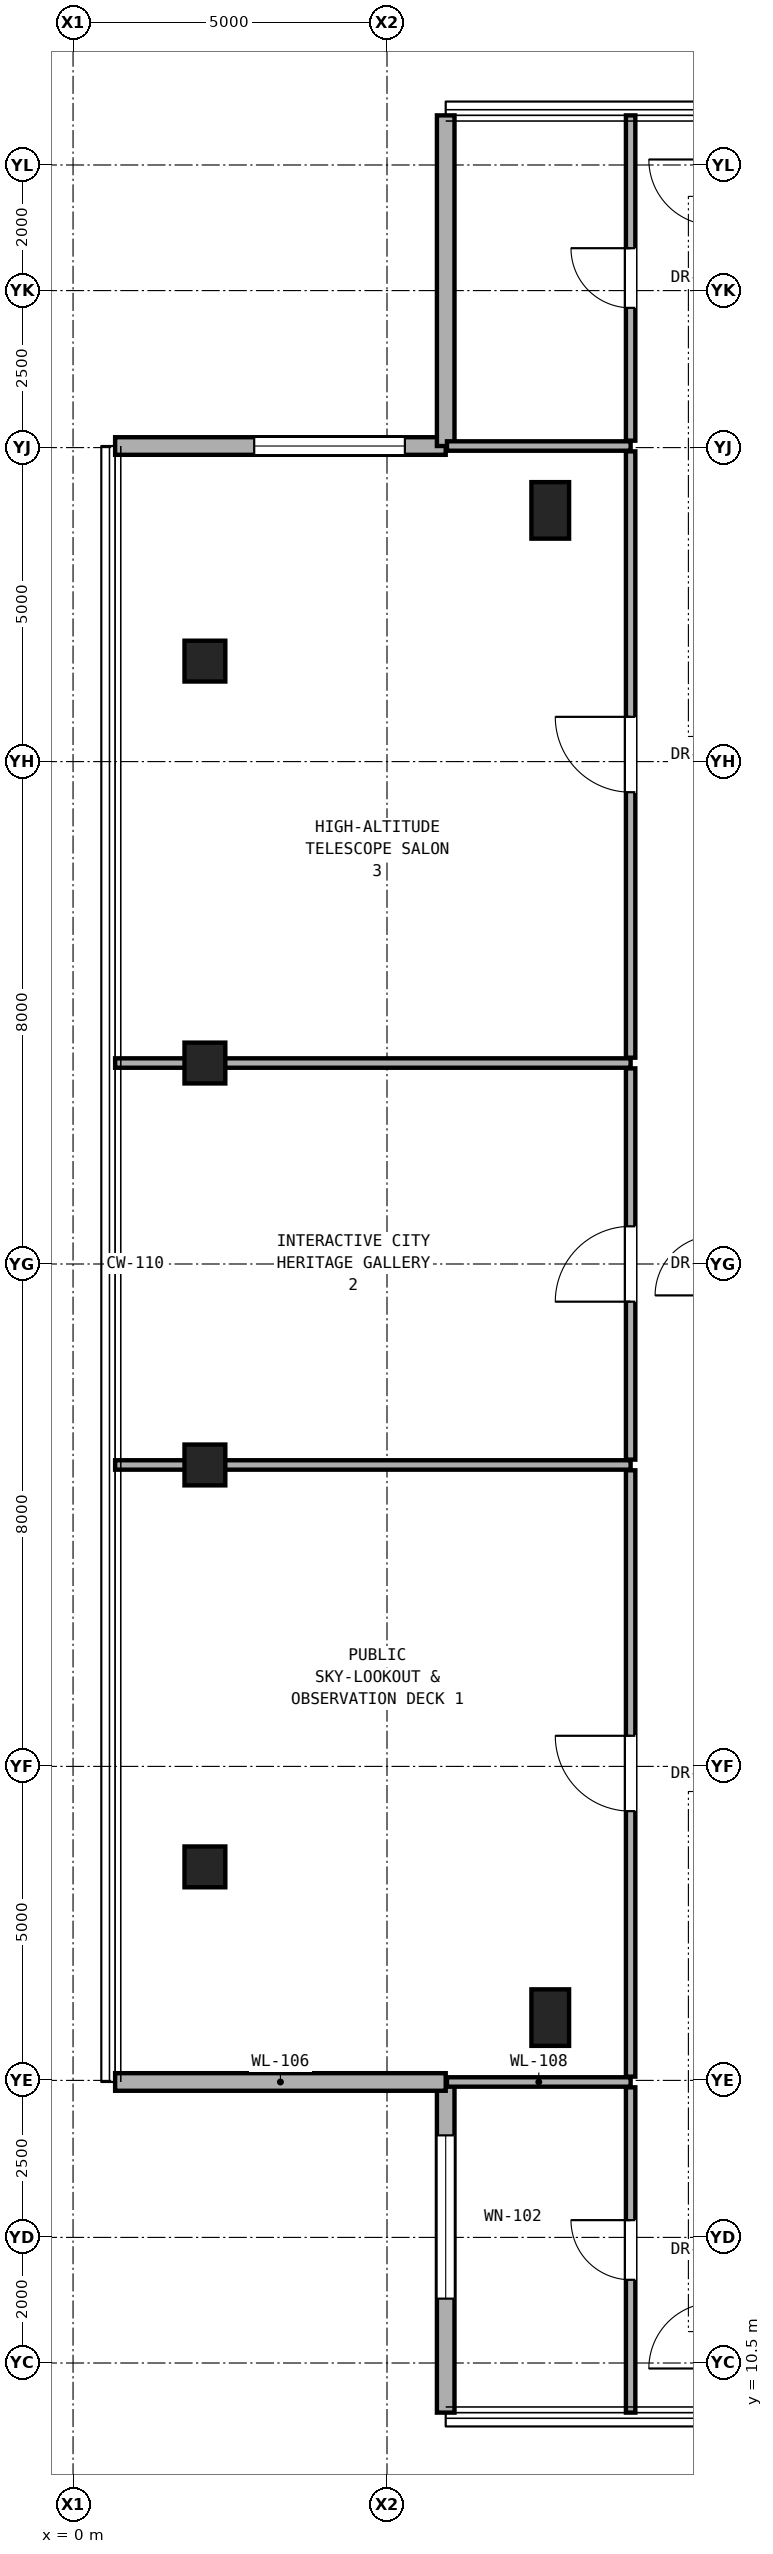
"""IFC4 building model, lengths in metres.
Left out: names, types, materials, properties, quantities, classifications, styles, units other than length and angle.
Written with IfcOpenShell. Run it as: python <this file> out.ifc"""

import sys

from ifc_helpers import new_model, si_unit, direction, frame, frame_2d, origin, origin_2d, place, context, subcontext, project, spatial, rectangle, hollow_rectangle, extrude, element, fill, save


model = new_model("IFC4")
c1 = context("Model", 3, precision=1e-05, world=origin(), true_north=direction((0.0, 1.0)))
c2 = subcontext(c1, "Body", "Model", "MODEL_VIEW")
j1 = project(units=[si_unit("LENGTHUNIT", "METRE"), si_unit("PLANEANGLEUNIT", "RADIAN")], contexts=[c1])
p1 = place(None, origin())
s1 = spatial("IfcSite", under=j1, at=p1, CompositionType="ELEMENT")
p2 = place(p1, origin())
s2 = spatial("IfcBuilding", under=s1, at=p2, CompositionType="ELEMENT")
p3 = place(p2, frame((0.0, 0.0, 249.1)))
s3 = spatial("IfcBuildingStorey", under=s2, at=p3, CompositionType="ELEMENT", Elevation=249.1)
for number, where, z_axis, x_axis in (
    (1, (2.1, 18.4, 0.0), (0.0, 0.0, 1.0), (1.0, 0.0, 0.0)),
    (2, (2.1, 24.8, 0.0), (0.0, 0.0, 1.0), (1.0, 0.0, 0.0)),
    (3, (2.1, 31.2, 0.0), (0.0, 0.0, 1.0), (1.0, 0.0, 0.0)),
    (4, (2.1, 37.6, 0.0), (0.0, 0.0, 1.0), (1.0, 0.0, 0.0)),
):
    element("IfcColumn", number, at=place(p3, frame(where, z_axis=z_axis, x_axis=x_axis)), inside=s3, PredefinedType="COLUMN", context=c2, shape_type="SweptSolid", body=[
        extrude(hollow_rectangle(XDim=0.65, YDim=0.65, WallThickness=0.036, at=origin_2d()), origin(), (0.0, 0.0, 1.0), 3.6),
    ])
for number, where, z_axis, x_axis in (
    (5, (7.6, 16.0, 0.0), (0.0, 0.0, 1.0), (1.0, 0.0, 0.0)),
    (6, (7.6, 40.0, 0.0), (0.0, 0.0, 1.0), (1.0, 0.0, 0.0)),
):
    element("IfcColumn", number, at=place(p3, frame(where, z_axis=z_axis, x_axis=x_axis)), inside=s3, PredefinedType="PILASTER", context=c2, shape_type="SweptSolid", body=[
        extrude(rectangle(XDim=0.6, YDim=0.9, at=origin_2d()), origin(), (0.0, 0.0, 1.0), 3.6),
    ])
p4 = place(p3, frame((5.935, 14.975, 0.0), z_axis=(0.0, 0.0, 1.0), x_axis=(0.0, -1.0, 0.0)))
e7 = element("IfcWall", 7, at=p4, inside=s3, PredefinedType="SOLIDWALL", context=c2, shape_type="SweptSolid", body=[
    extrude(rectangle(XDim=5.265, YDim=0.28, at=frame_2d((2.633, 0.0))), origin(), (0.0, 0.0, 1.0), 3.38),
])
p5 = place(p4, frame((0.85, 0.0, 0.63)))
e8 = element("IfcOpeningElement", 8, at=p5, cuts=e7, PredefinedType="OPENING", context=c2, shape_type="SweptSolid", body=[
    extrude(rectangle(XDim=2.6, YDim=2.6, at=frame_2d((1.3, 1.3))), frame((0.0, 0.15, 0.0), z_axis=(0.0, -1.0, 0.0), x_axis=(1.0, 0.0, 0.0)), (0.0, 0.0, 1.0), 0.3),
])
p6 = place(p3, frame((0.67, 14.975, 0.0), z_axis=(0.0, 0.0, 1.0), x_axis=(1.0, 0.0, 0.0)))
e9 = element("IfcWall", 9, at=p6, inside=s3, PredefinedType="SOLIDWALL", context=c2, shape_type="SweptSolid", body=[
    extrude(rectangle(XDim=5.265, YDim=0.28, at=frame_2d((2.633, 0.0))), origin(), (0.0, 0.0, 1.0), 3.38),
])
p7 = place(p3, frame((5.935, 41.025, 0.0), z_axis=(0.0, 0.0, 1.0), x_axis=(-1.0, 0.0, 0.0)))
e10 = element("IfcWall", 10, at=p7, inside=s3, PredefinedType="SOLIDWALL", context=c2, shape_type="SweptSolid", body=[
    extrude(rectangle(XDim=5.265, YDim=0.28, at=frame_2d((2.633, 0.0))), origin(), (0.0, 0.0, 1.0), 3.38),
])
p8 = place(p7, frame((0.65, 0.0, 0.85)))
e11 = element("IfcOpeningElement", 11, at=p8, cuts=e10, PredefinedType="OPENING", context=c2, shape_type="SweptSolid", body=[
    extrude(rectangle(XDim=2.4, YDim=2.35, at=frame_2d((1.2, 1.175))), frame((0.0, 0.15, 0.0), z_axis=(0.0, -1.0, 0.0), x_axis=(1.0, 0.0, 0.0)), (0.0, 0.0, 1.0), 0.3),
])
p9 = place(p3, frame((5.935, 46.29, 0.0), z_axis=(0.0, 0.0, 1.0), x_axis=(0.0, -1.0, 0.0)))
e12 = element("IfcWall", 12, at=p9, inside=s3, PredefinedType="SOLIDWALL", context=c2, shape_type="SweptSolid", body=[
    extrude(rectangle(XDim=5.265, YDim=0.28, at=frame_2d((2.633, 0.0))), origin(), (0.0, 0.0, 1.0), 3.38),
])
p10 = place(p3, frame((5.955, 14.975, 0.0), z_axis=(0.0, 0.0, 1.0), x_axis=(1.0, 0.0, 0.0)))
e13 = element("IfcWall", 13, at=p10, inside=s3, PredefinedType="PARTITIONING", context=c2, shape_type="SweptSolid", body=[
    extrude(rectangle(XDim=2.925, YDim=0.15, at=frame_2d((1.462, 0.0))), origin(), (0.0, 0.0, 1.0), 3.4),
])
for number, where, z_axis, x_axis in (
    (14, (0.67, 24.8, 0.0), (0.0, 0.0, 1.0), (1.0, 0.0, 0.0)),
    (15, (0.67, 31.2, 0.0), (0.0, 0.0, 1.0), (1.0, 0.0, 0.0)),
):
    element("IfcWall", number, at=place(p3, frame(where, z_axis=z_axis, x_axis=x_axis)), inside=s3, PredefinedType="PARTITIONING", context=c2, shape_type="SweptSolid", body=[
        extrude(rectangle(XDim=8.21, YDim=0.15, at=frame_2d((4.105, 0.0))), origin(), (0.0, 0.0, 1.0), 2.619),
    ])
p11 = place(p3, frame((5.955, 41.025, 0.0), z_axis=(0.0, 0.0, 1.0), x_axis=(1.0, 0.0, 0.0)))
e16 = element("IfcWall", 16, at=p11, inside=s3, PredefinedType="PARTITIONING", context=c2, shape_type="SweptSolid", body=[
    extrude(rectangle(XDim=2.925, YDim=0.15, at=frame_2d((1.462, 0.0))), origin(), (0.0, 0.0, 1.0), 3.4),
])
p12 = place(p3, frame((8.88, 9.71, 0.0), z_axis=(0.0, 0.0, 1.0), x_axis=(0.0, 1.0, 0.0)))
e17 = element("IfcWall", 17, at=p12, inside=s3, PredefinedType="PARTITIONING", context=c2, shape_type="SweptSolid", body=[
    extrude(rectangle(XDim=5.18, YDim=0.15, at=frame_2d((2.59, 0.0))), origin(), (0.0, 0.0, 1.0), 3.4),
])
p13 = place(p12, frame((2.115, 0.0, 0.0)))
e18 = element("IfcOpeningElement", 18, at=p13, cuts=e17, PredefinedType="OPENING", context=c2, shape_type="SweptSolid", body=[
    extrude(rectangle(XDim=0.95, YDim=2.15, at=frame_2d((0.475, 1.075))), frame((0.0, 0.085, 0.0), z_axis=(0.0, -1.0, 0.0), x_axis=(1.0, 0.0, 0.0)), (0.0, 0.0, 1.0), 0.17),
])
p14 = place(p3, frame((8.88, 15.06, 0.0), z_axis=(0.0, 0.0, 1.0), x_axis=(0.0, 1.0, 0.0)))
e19 = element("IfcWall", 19, at=p14, inside=s3, PredefinedType="PARTITIONING", context=c2, shape_type="SweptSolid", body=[
    extrude(rectangle(XDim=9.655, YDim=0.15, at=frame_2d((4.828, 0.0))), origin(), (0.0, 0.0, 1.0), 2.696),
])
p15 = place(p14, frame((4.228, 0.0, 0.0)))
e20 = element("IfcOpeningElement", 20, at=p15, cuts=e19, PredefinedType="OPENING", context=c2, shape_type="SweptSolid", body=[
    extrude(rectangle(XDim=1.2, YDim=2.25, at=frame_2d((0.6, 1.125))), frame((0.0, 0.085, 0.0), z_axis=(0.0, -1.0, 0.0), x_axis=(1.0, 0.0, 0.0)), (0.0, 0.0, 1.0), 0.17),
])
p16 = place(p3, frame((8.88, 24.885, 0.0), z_axis=(0.0, 0.0, 1.0), x_axis=(0.0, 1.0, 0.0)))
e21 = element("IfcWall", 21, at=p16, inside=s3, PredefinedType="PARTITIONING", context=c2, shape_type="SweptSolid", body=[
    extrude(rectangle(XDim=6.23, YDim=0.15, at=frame_2d((3.115, 0.0))), origin(), (0.0, 0.0, 1.0), 2.696),
])
p17 = place(p16, frame((2.515, 0.0, 0.0)))
e22 = element("IfcOpeningElement", 22, at=p17, cuts=e21, PredefinedType="OPENING", context=c2, shape_type="SweptSolid", body=[
    extrude(rectangle(XDim=1.2, YDim=2.25, at=frame_2d((0.6, 1.125))), frame((0.0, 0.085, 0.0), z_axis=(0.0, -1.0, 0.0), x_axis=(1.0, 0.0, 0.0)), (0.0, 0.0, 1.0), 0.17),
])
p18 = place(p3, frame((8.88, 31.285, 0.0), z_axis=(0.0, 0.0, 1.0), x_axis=(0.0, 1.0, 0.0)))
e23 = element("IfcWall", 23, at=p18, inside=s3, PredefinedType="PARTITIONING", context=c2, shape_type="SweptSolid", body=[
    extrude(rectangle(XDim=9.655, YDim=0.15, at=frame_2d((4.828, 0.0))), origin(), (0.0, 0.0, 1.0), 2.696),
])
p19 = place(p18, frame((4.228, 0.0, 0.0)))
e24 = element("IfcOpeningElement", 24, at=p19, cuts=e23, PredefinedType="OPENING", context=c2, shape_type="SweptSolid", body=[
    extrude(rectangle(XDim=1.2, YDim=2.25, at=frame_2d((0.6, 1.125))), frame((0.0, 0.085, 0.0), z_axis=(0.0, -1.0, 0.0), x_axis=(1.0, 0.0, 0.0)), (0.0, 0.0, 1.0), 0.17),
])
p20 = place(p3, frame((8.88, 41.11, 0.0), z_axis=(0.0, 0.0, 1.0), x_axis=(0.0, 1.0, 0.0)))
e25 = element("IfcWall", 25, at=p20, inside=s3, PredefinedType="PARTITIONING", context=c2, shape_type="SweptSolid", body=[
    extrude(rectangle(XDim=5.18, YDim=0.15, at=frame_2d((2.59, 0.0))), origin(), (0.0, 0.0, 1.0), 3.4),
])
p21 = place(p20, frame((2.115, 0.0, 0.0)))
e26 = element("IfcOpeningElement", 26, at=p21, cuts=e25, PredefinedType="OPENING", context=c2, shape_type="SweptSolid", body=[
    extrude(rectangle(XDim=0.95, YDim=2.15, at=frame_2d((0.475, 1.075))), frame((0.0, 0.085, 0.0), z_axis=(0.0, -1.0, 0.0), x_axis=(1.0, 0.0, 0.0)), (0.0, 0.0, 1.0), 0.17),
])
p22 = place(p5, origin())
e27 = element("IfcWindow", 27, at=p22, inside=s3, PartitioningType="SINGLE_PANEL", PredefinedType="WINDOW", context=c2, shape_type="SweptSolid", body=[
    extrude(rectangle(XDim=2.6, YDim=2.6, at=frame_2d((1.3, 1.3))), frame((0.0, 0.03, 0.0), z_axis=(0.0, -1.0, 0.0), x_axis=(1.0, 0.0, 0.0)), (0.0, 0.0, 1.0), 0.06),
])
fill(e8, e27)
p23 = place(p8, origin())
e28 = element("IfcWindow", 28, at=p23, inside=s3, PartitioningType="SINGLE_PANEL", PredefinedType="WINDOW", context=c2, shape_type="SweptSolid", body=[
    extrude(rectangle(XDim=2.4, YDim=2.35, at=frame_2d((1.2, 1.175))), frame((0.0, 0.03, 0.0), z_axis=(0.0, -1.0, 0.0), x_axis=(1.0, 0.0, 0.0)), (0.0, 0.0, 1.0), 0.06),
])
fill(e11, e28)
p24 = place(p15, origin())
e29 = element("IfcDoor", 29, at=p24, inside=s3, OperationType="SINGLE_SWING_RIGHT", PredefinedType="DOOR", context=c2, shape_type="SweptSolid", body=[
    extrude(rectangle(XDim=1.2, YDim=2.25, at=frame_2d((0.6, 1.125))), frame((0.0, 0.025, 0.0), z_axis=(0.0, -1.0, 0.0), x_axis=(1.0, 0.0, 0.0)), (0.0, 0.0, 1.0), 0.05),
])
fill(e20, e29)
p25 = place(p17, origin())
e30 = element("IfcDoor", 30, at=p25, inside=s3, OperationType="SINGLE_SWING_LEFT", PredefinedType="DOOR", context=c2, shape_type="SweptSolid", body=[
    extrude(rectangle(XDim=1.2, YDim=2.25, at=frame_2d((0.6, 1.125))), frame((0.0, 0.025, 0.0), z_axis=(0.0, -1.0, 0.0), x_axis=(1.0, 0.0, 0.0)), (0.0, 0.0, 1.0), 0.05),
])
fill(e22, e30)
p26 = place(p19, origin())
e31 = element("IfcDoor", 31, at=p26, inside=s3, OperationType="SINGLE_SWING_RIGHT", PredefinedType="DOOR", context=c2, shape_type="SweptSolid", body=[
    extrude(rectangle(XDim=1.2, YDim=2.25, at=frame_2d((0.6, 1.125))), frame((0.0, 0.025, 0.0), z_axis=(0.0, -1.0, 0.0), x_axis=(1.0, 0.0, 0.0)), (0.0, 0.0, 1.0), 0.05),
])
fill(e24, e31)
p27 = place(p13, origin())
e32 = element("IfcDoor", 32, at=p27, inside=s3, OperationType="SINGLE_SWING_RIGHT", PredefinedType="DOOR", context=c2, shape_type="SweptSolid", body=[
    extrude(rectangle(XDim=0.95, YDim=2.15, at=frame_2d((0.475, 1.075))), frame((0.0, 0.025, 0.0), z_axis=(0.0, -1.0, 0.0), x_axis=(1.0, 0.0, 0.0)), (0.0, 0.0, 1.0), 0.05),
])
fill(e18, e32)
p28 = place(p21, origin())
e33 = element("IfcDoor", 33, at=p28, inside=s3, OperationType="SINGLE_SWING_RIGHT", PredefinedType="DOOR", context=c2, shape_type="SweptSolid", body=[
    extrude(rectangle(XDim=0.95, YDim=2.15, at=frame_2d((0.475, 1.075))), frame((0.0, 0.025, 0.0), z_axis=(0.0, -1.0, 0.0), x_axis=(1.0, 0.0, 0.0)), (0.0, 0.0, 1.0), 0.05),
])
fill(e26, e33)
save(model, sys.argv[1])
